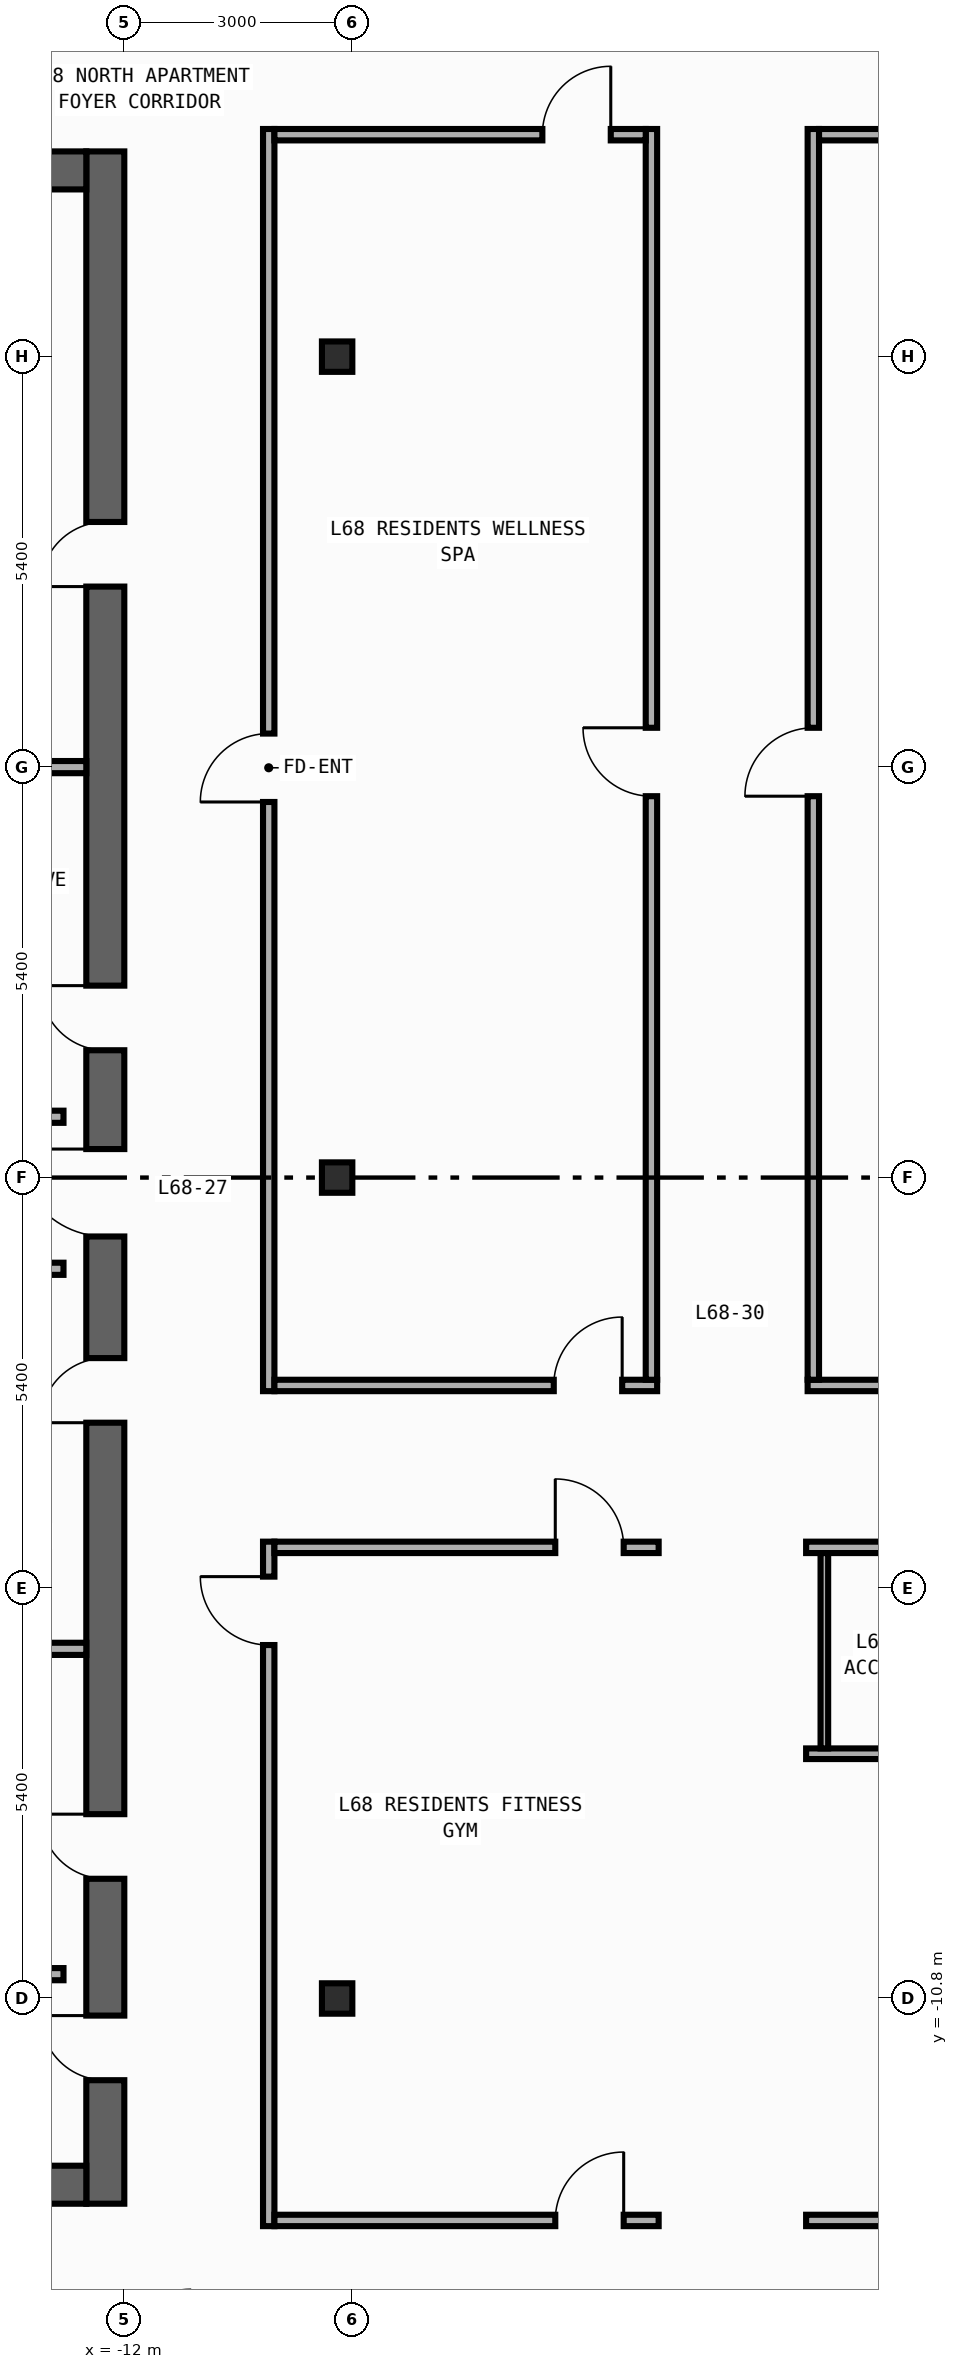
"""IFC4 building model, lengths in metres.
Left out: names, types, materials, properties, quantities, classifications, styles, units other than length and angle.
Written with IfcOpenShell. Run it as: python <this file> out.ifc"""

import sys

from ifc_helpers import new_model, si_unit, direction, frame, frame_2d, origin, origin_2d, place, context, subcontext, project, spatial, rectangle, i_section, extrude, element, fill, save


model = new_model("IFC4")
c1 = context("Model", 3, precision=1e-05, world=origin(), true_north=direction((0.0, 1.0)))
c2 = subcontext(c1, "Body", "Model", "MODEL_VIEW")
j1 = project(units=[si_unit("LENGTHUNIT", "METRE"), si_unit("PLANEANGLEUNIT", "RADIAN")], contexts=[c1])
p1 = place(None, origin())
s1 = spatial("IfcSite", under=j1, at=p1, CompositionType="ELEMENT")
p2 = place(p1, origin())
s2 = spatial("IfcBuilding", under=s1, at=p2, CompositionType="ELEMENT")
p3 = place(p2, frame((0.0, 0.0, 285.2)))
s3 = spatial("IfcBuildingStorey", under=s2, at=p3, CompositionType="ELEMENT", Elevation=285.2)
p4 = place(p3, frame((-12.25, -13.5, 0.0), z_axis=(0.0, 0.0, 1.0), x_axis=(0.0, 1.0, 0.0)))
e1 = element("IfcWall", 1, at=p4, inside=s3, PredefinedType="SHEAR", context=c2, shape_type="SweptSolid", body=[
    extrude(rectangle(XDim=27.0, YDim=0.5, at=frame_2d((13.5, 0.0))), origin(), (0.0, 0.0, 1.0), 3.54),
])
p5 = place(p4, frame((15.175, 0.0, 0.0)))
e2 = element("IfcOpeningElement", 2, at=p5, cuts=e1, PredefinedType="OPENING", context=c2, shape_type="SweptSolid", body=[
    extrude(rectangle(XDim=0.85, YDim=2.1, at=frame_2d((0.425, 1.05))), frame((0.0, 0.26, 0.0), z_axis=(0.0, -1.0, 0.0), x_axis=(1.0, 0.0, 0.0)), (0.0, 0.0, 1.0), 0.52),
])
p6 = place(p4, frame((21.275, 0.0, 0.0)))
e3 = element("IfcOpeningElement", 3, at=p6, cuts=e1, PredefinedType="OPENING", context=c2, shape_type="SweptSolid", body=[
    extrude(rectangle(XDim=0.85, YDim=2.1, at=frame_2d((0.425, 1.05))), frame((0.0, 0.26, 0.0), z_axis=(0.0, -1.0, 0.0), x_axis=(1.0, 0.0, 0.0)), (0.0, 0.0, 1.0), 0.52),
])
p7 = place(p4, frame((4.275, 0.0, 0.0)))
e4 = element("IfcOpeningElement", 4, at=p7, cuts=e1, PredefinedType="OPENING", context=c2, shape_type="SweptSolid", body=[
    extrude(rectangle(XDim=0.85, YDim=2.1, at=frame_2d((0.425, 1.05))), frame((0.0, 0.26, 0.0), z_axis=(0.0, -1.0, 0.0), x_axis=(1.0, 0.0, 0.0)), (0.0, 0.0, 1.0), 0.52),
])
p8 = place(p4, frame((10.275, 0.0, 0.0)))
e5 = element("IfcOpeningElement", 5, at=p8, cuts=e1, PredefinedType="OPENING", context=c2, shape_type="SweptSolid", body=[
    extrude(rectangle(XDim=0.85, YDim=2.1, at=frame_2d((0.425, 1.05))), frame((0.0, 0.26, 0.0), z_axis=(0.0, -1.0, 0.0), x_axis=(1.0, 0.0, 0.0)), (0.0, 0.0, 1.0), 0.52),
])
p9 = place(p4, frame((12.725, 0.0, 0.0)))
e6 = element("IfcOpeningElement", 6, at=p9, cuts=e1, PredefinedType="OPENING", context=c2, shape_type="SweptSolid", body=[
    extrude(rectangle(XDim=1.15, YDim=2.2, at=frame_2d((0.575, 1.1))), frame((0.0, 0.26, 0.0), z_axis=(0.0, -1.0, 0.0), x_axis=(1.0, 0.0, 0.0)), (0.0, 0.0, 1.0), 0.52),
])
p10 = place(p4, frame((1.625, 0.0, 0.0)))
e7 = element("IfcOpeningElement", 7, at=p10, cuts=e1, PredefinedType="OPENING", context=c2, shape_type="SweptSolid", body=[
    extrude(rectangle(XDim=0.85, YDim=2.1, at=frame_2d((0.425, 1.05))), frame((0.0, 0.26, 0.0), z_axis=(0.0, -1.0, 0.0), x_axis=(1.0, 0.0, 0.0)), (0.0, 0.0, 1.0), 0.52),
])
for number, where, z_axis, x_axis in (
    (8, (-19.9, -13.25, 0.0), (0.0, 0.0, 1.0), (1.0, 0.0, 0.0)),
    (9, (-19.9, 13.25, 0.0), (0.0, 0.0, 1.0), (1.0, 0.0, 0.0)),
):
    element("IfcWall", number, at=place(p3, frame(where, z_axis=z_axis, x_axis=x_axis)), inside=s3, PredefinedType="SHEAR", context=c2, shape_type="SweptSolid", body=[
        extrude(rectangle(XDim=7.4, YDim=0.5, at=frame_2d((3.7, 0.0))), origin(), (0.0, 0.0, 1.0), 3.54),
    ])
for number, where, z_axis, x_axis in (
    (10, (-9.2, -10.8, 0.0), (0.0, 0.0, 1.0), (1.0, 0.0, 0.0)),
    (11, (-9.2, 0.0, 0.0), (0.0, 0.0, 1.0), (1.0, 0.0, 0.0)),
    (12, (-9.2, 10.8, 0.0), (0.0, 0.0, 1.0), (1.0, 0.0, 0.0)),
):
    element("IfcColumn", number, at=place(p3, frame(where, z_axis=z_axis, x_axis=x_axis)), inside=s3, PredefinedType="COLUMN", context=c2, shape_type="SweptSolid", body=[
        extrude(i_section(OverallWidth=0.4, OverallDepth=0.4, WebThickness=0.013, FlangeThickness=0.021, FilletRadius=0.022, at=origin_2d()), origin(), (0.0, 0.0, 1.0), 3.8),
    ])
for number, where, z_axis, x_axis in (
    (13, (-15.4, 0.8, 0.0), (0.0, 0.0, 1.0), (1.0, 0.0, 0.0)),
    (14, (-15.4, -1.2, 0.0), (0.0, 0.0, 1.0), (1.0, 0.0, 0.0)),
    (15, (-15.4, -10.48, 0.0), (0.0, 0.0, 1.0), (1.0, 0.0, 0.0)),
):
    element("IfcWall", number, at=place(p3, frame(where, z_axis=z_axis, x_axis=x_axis)), inside=s3, PredefinedType="STANDARD", context=c2, shape_type="SweptSolid", body=[
        extrude(rectangle(XDim=2.6, YDim=0.16, at=frame_2d((1.3, 0.0))), origin(), (0.0, 0.0, 1.0), 3.54),
    ])
for number, where, z_axis, x_axis in (
    (16, (-15.4, 5.4, 0.0), (0.0, 0.0, 1.0), (1.0, 0.0, 0.0)),
    (17, (-15.4, -6.2, 0.0), (0.0, 0.0, 1.0), (1.0, 0.0, 0.0)),
):
    element("IfcWall", number, at=place(p3, frame(where, z_axis=z_axis, x_axis=x_axis)), inside=s3, PredefinedType="PARTITIONING", context=c2, shape_type="SweptSolid", body=[
        extrude(rectangle(XDim=2.9, YDim=0.16, at=frame_2d((1.45, 0.0))), origin(), (0.0, 0.0, 1.0), 3.54),
    ])
p11 = place(p3, frame((-10.1, -2.81, 0.0), z_axis=(0.0, 0.0, 1.0), x_axis=(0.0, 1.0, 0.0)))
e18 = element("IfcWall", 18, at=p11, inside=s3, PredefinedType="PARTITIONING", context=c2, shape_type="SweptSolid", body=[
    extrude(rectangle(XDim=16.605, YDim=0.15, at=frame_2d((8.302, 0.0))), origin(), (0.0, 0.0, 1.0), 3.54),
])
p12 = place(p11, frame((7.751, 0.0, 0.0)))
e19 = element("IfcOpeningElement", 19, at=p12, cuts=e18, PredefinedType="OPENING", context=c2, shape_type="SweptSolid", body=[
    extrude(rectangle(XDim=0.9, YDim=2.15, at=frame_2d((0.45, 1.075))), frame((0.0, 0.085, 0.0), z_axis=(0.0, -1.0, 0.0), x_axis=(1.0, 0.0, 0.0)), (0.0, 0.0, 1.0), 0.17),
])
p13 = place(p3, frame((-10.1, -13.795, 0.0), z_axis=(0.0, 0.0, 1.0), x_axis=(0.0, 1.0, 0.0)))
e20 = element("IfcWall", 20, at=p13, inside=s3, PredefinedType="PARTITIONING", context=c2, shape_type="SweptSolid", body=[
    extrude(rectangle(XDim=9.005, YDim=0.15, at=frame_2d((4.502, 0.0))), origin(), (0.0, 0.0, 1.0), 3.54),
])
p14 = place(p13, frame((7.645, 0.0, 0.0)))
e21 = element("IfcOpeningElement", 21, at=p14, cuts=e20, PredefinedType="OPENING", context=c2, shape_type="SweptSolid", body=[
    extrude(rectangle(XDim=0.9, YDim=2.15, at=frame_2d((0.45, 1.075))), frame((0.0, 0.085, 0.0), z_axis=(0.0, -1.0, 0.0), x_axis=(1.0, 0.0, 0.0)), (0.0, 0.0, 1.0), 0.17),
])
p15 = place(p3, frame((-10.025, -2.735, 0.0), z_axis=(0.0, 0.0, 1.0), x_axis=(1.0, 0.0, 0.0)))
e22 = element("IfcWall", 22, at=p15, inside=s3, PredefinedType="PARTITIONING", context=c2, shape_type="SweptSolid", body=[
    extrude(rectangle(XDim=5.035, YDim=0.15, at=frame_2d((2.518, 0.0))), origin(), (0.0, 0.0, 1.0), 3.54),
])
p16 = place(p15, frame((3.675, 0.0, 0.0)))
e23 = element("IfcOpeningElement", 23, at=p16, cuts=e22, PredefinedType="OPENING", context=c2, shape_type="SweptSolid", body=[
    extrude(rectangle(XDim=0.9, YDim=2.15, at=frame_2d((0.45, 1.075))), frame((0.0, 0.085, 0.0), z_axis=(0.0, -1.0, 0.0), x_axis=(1.0, 0.0, 0.0)), (0.0, 0.0, 1.0), 0.17),
])
p17 = place(p3, frame((-10.025, -4.865, 0.0), z_axis=(0.0, 0.0, 1.0), x_axis=(1.0, 0.0, 0.0)))
e24 = element("IfcWall", 24, at=p17, inside=s3, PredefinedType="PARTITIONING", context=c2, shape_type="SweptSolid", body=[
    extrude(rectangle(XDim=5.055, YDim=0.15, at=frame_2d((2.527, 0.0))), origin(), (0.0, 0.0, 1.0), 3.54),
])
p18 = place(p17, frame((3.695, 0.0, 0.0)))
e25 = element("IfcOpeningElement", 25, at=p18, cuts=e24, PredefinedType="OPENING", context=c2, shape_type="SweptSolid", body=[
    extrude(rectangle(XDim=0.9, YDim=2.15, at=frame_2d((0.45, 1.075))), frame((0.0, 0.085, 0.0), z_axis=(0.0, -1.0, 0.0), x_axis=(1.0, 0.0, 0.0)), (0.0, 0.0, 1.0), 0.17),
])
p19 = place(p3, frame((-3.01, -2.735, 0.0), z_axis=(0.0, 0.0, 1.0), x_axis=(1.0, 0.0, 0.0)))
e26 = element("IfcWall", 26, at=p19, inside=s3, PredefinedType="PARTITIONING", context=c2, shape_type="SweptSolid", body=[
    extrude(rectangle(XDim=13.035, YDim=0.15, at=frame_2d((6.518, 0.0))), origin(), (0.0, 0.0, 1.0), 3.54),
])
p20 = place(p19, frame((2.463, 0.0, 0.0)))
e27 = element("IfcOpeningElement", 27, at=p20, cuts=e26, PredefinedType="OPENING", context=c2, shape_type="SweptSolid", body=[
    extrude(rectangle(XDim=0.9, YDim=2.15, at=frame_2d((0.45, 1.075))), frame((0.0, 0.085, 0.0), z_axis=(0.0, -1.0, 0.0), x_axis=(1.0, 0.0, 0.0)), (0.0, 0.0, 1.0), 0.17),
])
p21 = place(p3, frame((-3.03, -4.865, 0.0), z_axis=(0.0, 0.0, 1.0), x_axis=(1.0, 0.0, 0.0)))
e28 = element("IfcWall", 28, at=p21, inside=s3, PredefinedType="PARTITIONING", context=c2, shape_type="SweptSolid", body=[
    extrude(rectangle(XDim=3.07, YDim=0.15, at=frame_2d((1.535, 0.0))), origin(), (0.0, 0.0, 1.0), 3.54),
])
p22 = place(p21, frame((1.71, 0.0, 0.0)))
e29 = element("IfcOpeningElement", 29, at=p22, cuts=e28, PredefinedType="OPENING", context=c2, shape_type="SweptSolid", body=[
    extrude(rectangle(XDim=0.9, YDim=2.15, at=frame_2d((0.45, 1.075))), frame((0.0, 0.085, 0.0), z_axis=(0.0, -1.0, 0.0), x_axis=(1.0, 0.0, 0.0)), (0.0, 0.0, 1.0), 0.17),
])
p23 = place(p3, frame((-5.065, -2.66, 0.0), z_axis=(0.0, 0.0, 1.0), x_axis=(0.0, 1.0, 0.0)))
e30 = element("IfcWall", 30, at=p23, inside=s3, PredefinedType="PARTITIONING", context=c2, shape_type="SweptSolid", body=[
    extrude(rectangle(XDim=16.455, YDim=0.15, at=frame_2d((8.228, 0.0))), origin(), (0.0, 0.0, 1.0), 3.19),
])
p24 = place(p23, frame((7.677, 0.0, 0.0)))
e31 = element("IfcOpeningElement", 31, at=p24, cuts=e30, PredefinedType="OPENING", context=c2, shape_type="SweptSolid", body=[
    extrude(rectangle(XDim=0.9, YDim=2.15, at=frame_2d((0.45, 1.075))), frame((0.0, 0.085, 0.0), z_axis=(0.0, -1.0, 0.0), x_axis=(1.0, 0.0, 0.0)), (0.0, 0.0, 1.0), 0.17),
])
p25 = place(p3, frame((-2.935, -2.66, 0.0), z_axis=(0.0, 0.0, 1.0), x_axis=(0.0, 1.0, 0.0)))
e32 = element("IfcWall", 32, at=p25, inside=s3, PredefinedType="PARTITIONING", context=c2, shape_type="SweptSolid", body=[
    extrude(rectangle(XDim=16.455, YDim=0.15, at=frame_2d((8.228, 0.0))), origin(), (0.0, 0.0, 1.0), 3.54),
])
p26 = place(p25, frame((7.677, 0.0, 0.0)))
e33 = element("IfcOpeningElement", 33, at=p26, cuts=e32, PredefinedType="OPENING", context=c2, shape_type="SweptSolid", body=[
    extrude(rectangle(XDim=0.9, YDim=2.15, at=frame_2d((0.45, 1.075))), frame((0.0, 0.085, 0.0), z_axis=(0.0, -1.0, 0.0), x_axis=(1.0, 0.0, 0.0)), (0.0, 0.0, 1.0), 0.17),
])
p27 = place(p3, frame((-10.025, 13.72, 0.0), z_axis=(0.0, 0.0, 1.0), x_axis=(1.0, 0.0, 0.0)))
e34 = element("IfcWall", 34, at=p27, inside=s3, PredefinedType="PARTITIONING", context=c2, shape_type="SweptSolid", body=[
    extrude(rectangle(XDim=4.885, YDim=0.15, at=frame_2d((2.442, 0.0))), origin(), (0.0, 0.0, 1.0), 3.54),
])
p28 = place(p27, frame((3.525, 0.0, 0.0)))
e35 = element("IfcOpeningElement", 35, at=p28, cuts=e34, PredefinedType="OPENING", context=c2, shape_type="SweptSolid", body=[
    extrude(rectangle(XDim=0.9, YDim=2.15, at=frame_2d((0.45, 1.075))), frame((0.0, 0.085, 0.0), z_axis=(0.0, -1.0, 0.0), x_axis=(1.0, 0.0, 0.0)), (0.0, 0.0, 1.0), 0.17),
])
p29 = place(p3, frame((-2.86, 13.72, 0.0), z_axis=(0.0, 0.0, 1.0), x_axis=(1.0, 0.0, 0.0)))
e36 = element("IfcWall", 36, at=p29, inside=s3, PredefinedType="PARTITIONING", context=c2, shape_type="SweptSolid", body=[
    extrude(rectangle(XDim=12.885, YDim=0.15, at=frame_2d((6.442, 0.0))), origin(), (0.0, 0.0, 1.0), 3.54),
])
p30 = place(p29, frame((4.692, 0.0, 0.0)))
e37 = element("IfcOpeningElement", 37, at=p30, cuts=e36, PredefinedType="OPENING", context=c2, shape_type="SweptSolid", body=[
    extrude(rectangle(XDim=0.9, YDim=2.15, at=frame_2d((0.45, 1.075))), frame((0.0, 0.085, 0.0), z_axis=(0.0, -1.0, 0.0), x_axis=(1.0, 0.0, 0.0)), (0.0, 0.0, 1.0), 0.17),
])
p31 = place(p3, frame((-10.025, -13.72, 0.0), z_axis=(0.0, 0.0, 1.0), x_axis=(1.0, 0.0, 0.0)))
e38 = element("IfcWall", 38, at=p31, inside=s3, PredefinedType="PARTITIONING", context=c2, shape_type="SweptSolid", body=[
    extrude(rectangle(XDim=5.055, YDim=0.15, at=frame_2d((2.527, 0.0))), origin(), (0.0, 0.0, 1.0), 3.54),
])
p32 = place(p31, frame((3.695, 0.0, 0.0)))
e39 = element("IfcOpeningElement", 39, at=p32, cuts=e38, PredefinedType="OPENING", context=c2, shape_type="SweptSolid", body=[
    extrude(rectangle(XDim=0.9, YDim=2.15, at=frame_2d((0.45, 1.075))), frame((0.0, 0.085, 0.0), z_axis=(0.0, -1.0, 0.0), x_axis=(1.0, 0.0, 0.0)), (0.0, 0.0, 1.0), 0.17),
])
p33 = place(p3, frame((-3.03, -13.72, 0.0), z_axis=(0.0, 0.0, 1.0), x_axis=(1.0, 0.0, 0.0)))
e40 = element("IfcWall", 40, at=p33, inside=s3, PredefinedType="PARTITIONING", context=c2, shape_type="SweptSolid", body=[
    extrude(rectangle(XDim=13.055, YDim=0.15, at=frame_2d((6.527, 0.0))), origin(), (0.0, 0.0, 1.0), 3.54),
])
p34 = place(p33, frame((4.874, 0.0, 0.0)))
e41 = element("IfcOpeningElement", 41, at=p34, cuts=e40, PredefinedType="OPENING", context=c2, shape_type="SweptSolid", body=[
    extrude(rectangle(XDim=0.9, YDim=2.15, at=frame_2d((0.45, 1.075))), frame((0.0, 0.085, 0.0), z_axis=(0.0, -1.0, 0.0), x_axis=(1.0, 0.0, 0.0)), (0.0, 0.0, 1.0), 0.17),
])
p35 = place(p3, frame((-3.03, -7.58, 0.0), z_axis=(0.0, 0.0, 1.0), x_axis=(1.0, 0.0, 0.0)))
e42 = element("IfcWall", 42, at=p35, inside=s3, PredefinedType="PARTITIONING", context=c2, shape_type="SweptSolid", body=[
    extrude(rectangle(XDim=3.07, YDim=0.14, at=frame_2d((1.535, 0.0))), origin(), (0.0, 0.0, 1.0), 3.54),
])
p36 = place(p3, frame((-2.79, -7.51, 0.0), z_axis=(0.0, 0.0, 1.0), x_axis=(0.0, 1.0, 0.0)))
e43 = element("IfcWall", 43, at=p36, inside=s3, PredefinedType="PARTITIONING", context=c2, shape_type="SweptSolid", body=[
    extrude(rectangle(XDim=2.57, YDim=0.1, at=frame_2d((1.285, 0.0))), origin(), (0.0, 0.0, 1.0), 3.54),
])
p37 = place(p5, origin())
e44 = element("IfcDoor", 44, at=p37, inside=s3, OperationType="SINGLE_SWING_RIGHT", PredefinedType="DOOR", context=c2, shape_type="SweptSolid", body=[
    extrude(rectangle(XDim=0.85, YDim=2.1, at=frame_2d((0.425, 1.05))), frame((0.0, 0.025, 0.0), z_axis=(0.0, -1.0, 0.0), x_axis=(1.0, 0.0, 0.0)), (0.0, 0.0, 1.0), 0.05),
])
fill(e2, e44)
p38 = place(p6, origin())
e45 = element("IfcDoor", 45, at=p38, inside=s3, OperationType="SINGLE_SWING_LEFT", PredefinedType="DOOR", context=c2, shape_type="SweptSolid", body=[
    extrude(rectangle(XDim=0.85, YDim=2.1, at=frame_2d((0.425, 1.05))), frame((0.0, 0.025, 0.0), z_axis=(0.0, -1.0, 0.0), x_axis=(1.0, 0.0, 0.0)), (0.0, 0.0, 1.0), 0.05),
])
fill(e3, e45)
p39 = place(p7, origin())
e46 = element("IfcDoor", 46, at=p39, inside=s3, OperationType="SINGLE_SWING_RIGHT", PredefinedType="DOOR", context=c2, shape_type="SweptSolid", body=[
    extrude(rectangle(XDim=0.85, YDim=2.1, at=frame_2d((0.425, 1.05))), frame((0.0, 0.025, 0.0), z_axis=(0.0, -1.0, 0.0), x_axis=(1.0, 0.0, 0.0)), (0.0, 0.0, 1.0), 0.05),
])
fill(e4, e46)
p40 = place(p8, origin())
e47 = element("IfcDoor", 47, at=p40, inside=s3, OperationType="SINGLE_SWING_LEFT", PredefinedType="DOOR", context=c2, shape_type="SweptSolid", body=[
    extrude(rectangle(XDim=0.85, YDim=2.1, at=frame_2d((0.425, 1.05))), frame((0.0, 0.025, 0.0), z_axis=(0.0, -1.0, 0.0), x_axis=(1.0, 0.0, 0.0)), (0.0, 0.0, 1.0), 0.05),
])
fill(e5, e47)
p41 = place(p9, origin())
e48 = element("IfcDoor", 48, at=p41, inside=s3, OperationType="SINGLE_SWING_RIGHT", PredefinedType="DOOR", context=c2, shape_type="SweptSolid", body=[
    extrude(rectangle(XDim=1.15, YDim=2.2, at=frame_2d((0.575, 1.1))), frame((0.0, 0.025, 0.0), z_axis=(0.0, -1.0, 0.0), x_axis=(1.0, 0.0, 0.0)), (0.0, 0.0, 1.0), 0.05),
])
fill(e6, e48)
p42 = place(p10, origin())
e49 = element("IfcDoor", 49, at=p42, inside=s3, OperationType="SINGLE_SWING_RIGHT", PredefinedType="DOOR", context=c2, shape_type="SweptSolid", body=[
    extrude(rectangle(XDim=0.85, YDim=2.1, at=frame_2d((0.425, 1.05))), frame((0.0, 0.025, 0.0), z_axis=(0.0, -1.0, 0.0), x_axis=(1.0, 0.0, 0.0)), (0.0, 0.0, 1.0), 0.05),
])
fill(e7, e49)
p43 = place(p12, origin())
e50 = element("IfcDoor", 50, at=p43, inside=s3, OperationType="SINGLE_SWING_LEFT", PredefinedType="DOOR", context=c2, shape_type="SweptSolid", body=[
    extrude(rectangle(XDim=0.9, YDim=2.15, at=frame_2d((0.45, 1.075))), frame((0.0, 0.025, 0.0), z_axis=(0.0, -1.0, 0.0), x_axis=(1.0, 0.0, 0.0)), (0.0, 0.0, 1.0), 0.05),
])
fill(e19, e50)
p44 = place(p14, origin())
e51 = element("IfcDoor", 51, at=p44, inside=s3, OperationType="SINGLE_SWING_RIGHT", PredefinedType="DOOR", context=c2, shape_type="SweptSolid", body=[
    extrude(rectangle(XDim=0.9, YDim=2.15, at=frame_2d((0.45, 1.075))), frame((0.0, 0.025, 0.0), z_axis=(0.0, -1.0, 0.0), x_axis=(1.0, 0.0, 0.0)), (0.0, 0.0, 1.0), 0.05),
])
fill(e21, e51)
p45 = place(p16, origin())
e52 = element("IfcDoor", 52, at=p45, inside=s3, OperationType="SINGLE_SWING_RIGHT", PredefinedType="DOOR", context=c2, shape_type="SweptSolid", body=[
    extrude(rectangle(XDim=0.9, YDim=2.15, at=frame_2d((0.45, 1.075))), frame((0.0, 0.025, 0.0), z_axis=(0.0, -1.0, 0.0), x_axis=(1.0, 0.0, 0.0)), (0.0, 0.0, 1.0), 0.05),
])
fill(e23, e52)
p46 = place(p18, origin())
e53 = element("IfcDoor", 53, at=p46, inside=s3, OperationType="SINGLE_SWING_LEFT", PredefinedType="DOOR", context=c2, shape_type="SweptSolid", body=[
    extrude(rectangle(XDim=0.9, YDim=2.15, at=frame_2d((0.45, 1.075))), frame((0.0, 0.025, 0.0), z_axis=(0.0, -1.0, 0.0), x_axis=(1.0, 0.0, 0.0)), (0.0, 0.0, 1.0), 0.05),
])
fill(e25, e53)
p47 = place(p24, origin())
e54 = element("IfcDoor", 54, at=p47, inside=s3, OperationType="SINGLE_SWING_RIGHT", PredefinedType="DOOR", context=c2, shape_type="SweptSolid", body=[
    extrude(rectangle(XDim=0.9, YDim=2.15, at=frame_2d((0.45, 1.075))), frame((0.0, 0.025, 0.0), z_axis=(0.0, -1.0, 0.0), x_axis=(1.0, 0.0, 0.0)), (0.0, 0.0, 1.0), 0.05),
])
fill(e31, e54)
p48 = place(p26, origin())
e55 = element("IfcDoor", 55, at=p48, inside=s3, OperationType="SINGLE_SWING_LEFT", PredefinedType="DOOR", context=c2, shape_type="SweptSolid", body=[
    extrude(rectangle(XDim=0.9, YDim=2.15, at=frame_2d((0.45, 1.075))), frame((0.0, 0.025, 0.0), z_axis=(0.0, -1.0, 0.0), x_axis=(1.0, 0.0, 0.0)), (0.0, 0.0, 1.0), 0.05),
])
fill(e33, e55)
p49 = place(p28, origin())
e56 = element("IfcDoor", 56, at=p49, inside=s3, OperationType="SINGLE_SWING_RIGHT", PredefinedType="DOOR", context=c2, shape_type="SweptSolid", body=[
    extrude(rectangle(XDim=0.9, YDim=2.15, at=frame_2d((0.45, 1.075))), frame((0.0, 0.025, 0.0), z_axis=(0.0, -1.0, 0.0), x_axis=(1.0, 0.0, 0.0)), (0.0, 0.0, 1.0), 0.05),
])
fill(e35, e56)
p50 = place(p32, origin())
e57 = element("IfcDoor", 57, at=p50, inside=s3, OperationType="SINGLE_SWING_RIGHT", PredefinedType="DOOR", context=c2, shape_type="SweptSolid", body=[
    extrude(rectangle(XDim=0.9, YDim=2.15, at=frame_2d((0.45, 1.075))), frame((0.0, 0.025, 0.0), z_axis=(0.0, -1.0, 0.0), x_axis=(1.0, 0.0, 0.0)), (0.0, 0.0, 1.0), 0.05),
])
fill(e39, e57)
save(model, sys.argv[1])
